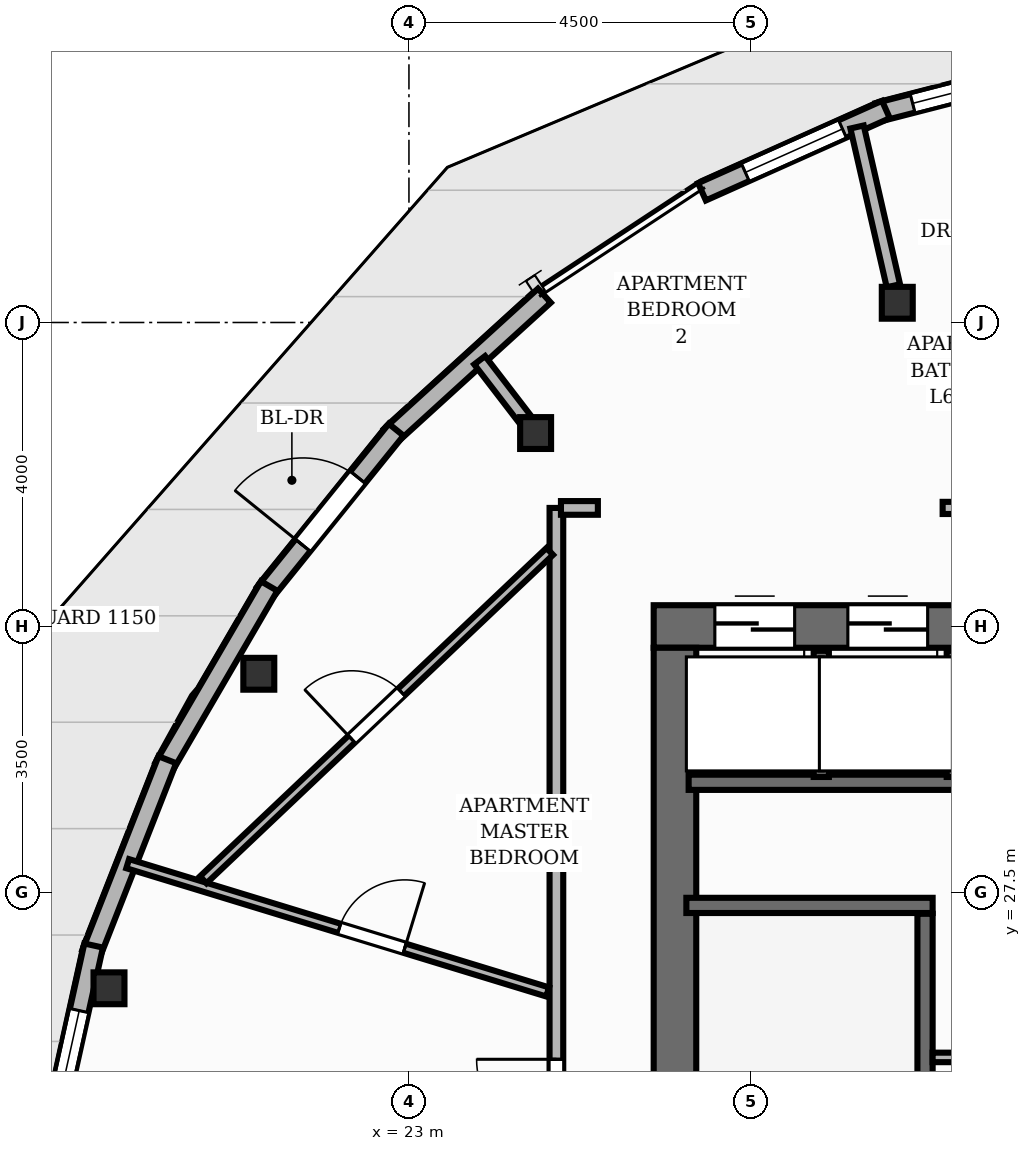
"""IFC4 building model, lengths in metres.
Left out: names, types, materials, properties, quantities, classifications, styles, units other than length and angle.
Written with IfcOpenShell. Run it as: python <this file> out.ifc"""

import sys

from ifc_helpers import new_model, si_unit, direction, frame, frame_2d, origin, origin_2d, place, context, subcontext, project, spatial, rectangle, i_section, extrude, element, fill, save


model = new_model("IFC4")
c1 = context("Model", 3, precision=1e-05, world=origin(), true_north=direction((0.0, 1.0)))
c2 = subcontext(c1, "Body", "Model", "MODEL_VIEW")
j1 = project(units=[si_unit("LENGTHUNIT", "METRE"), si_unit("PLANEANGLEUNIT", "RADIAN")], contexts=[c1])
p1 = place(None, origin())
s1 = spatial("IfcSite", under=j1, at=p1, CompositionType="ELEMENT")
p2 = place(p1, origin())
s2 = spatial("IfcBuilding", under=s1, at=p2, CompositionType="ELEMENT")
p3 = place(p2, frame((0.0, 0.0, 220.64)))
s3 = spatial("IfcBuildingStorey", under=s2, at=p3, CompositionType="ELEMENT", Elevation=220.64)
p4 = place(p3, frame((26.22, 31.0, 0.0), z_axis=(0.0, 0.0, 1.0), x_axis=(1.0, 0.0, 0.0)))
e1 = element("IfcWall", 1, at=p4, inside=s3, PredefinedType="SHEAR", context=c2, shape_type="SweptSolid", body=[
    extrude(rectangle(XDim=11.56, YDim=0.56, at=frame_2d((5.78, 0.0))), origin(), (0.0, 0.0, 1.0), 3.2),
])
p5 = place(p4, frame((8.18, 0.0, 0.0)))
e2 = element("IfcOpeningElement", 2, at=p5, cuts=e1, PredefinedType="OPENING", context=c2, shape_type="SweptSolid", body=[
    extrude(rectangle(XDim=1.1, YDim=2.15, at=frame_2d((0.55, 1.075))), frame((0.0, 0.29, 0.0), z_axis=(0.0, -1.0, 0.0), x_axis=(1.0, 0.0, 0.0)), (0.0, 0.0, 1.0), 0.58),
])
p6 = place(p4, frame((0.805, 0.0, 0.0)))
e3 = element("IfcOpeningElement", 3, at=p6, cuts=e1, PredefinedType="OPENING", context=c2, shape_type="SweptSolid", body=[
    extrude(rectangle(XDim=1.05, YDim=2.15, at=frame_2d((0.525, 1.075))), frame((0.0, 0.29, 0.0), z_axis=(0.0, -1.0, 0.0), x_axis=(1.0, 0.0, 0.0)), (0.0, 0.0, 1.0), 0.58),
])
p7 = place(p4, frame((2.555, 0.0, 0.0)))
e4 = element("IfcOpeningElement", 4, at=p7, cuts=e1, PredefinedType="OPENING", context=c2, shape_type="SweptSolid", body=[
    extrude(rectangle(XDim=1.05, YDim=2.15, at=frame_2d((0.525, 1.075))), frame((0.0, 0.29, 0.0), z_axis=(0.0, -1.0, 0.0), x_axis=(1.0, 0.0, 0.0)), (0.0, 0.0, 1.0), 0.58),
])
p8 = place(p4, frame((4.305, 0.0, 0.0)))
e5 = element("IfcOpeningElement", 5, at=p8, cuts=e1, PredefinedType="OPENING", context=c2, shape_type="SweptSolid", body=[
    extrude(rectangle(XDim=1.05, YDim=2.15, at=frame_2d((0.525, 1.075))), frame((0.0, 0.29, 0.0), z_axis=(0.0, -1.0, 0.0), x_axis=(1.0, 0.0, 0.0)), (0.0, 0.0, 1.0), 0.58),
])
p9 = place(p3, frame((26.5, 17.28, 0.0), z_axis=(0.0, 0.0, 1.0), x_axis=(0.0, 1.0, 0.0)))
e6 = element("IfcWall", 6, at=p9, inside=s3, PredefinedType="SHEAR", context=c2, shape_type="SweptSolid", body=[
    extrude(rectangle(XDim=13.44, YDim=0.56, at=frame_2d((6.72, 0.0))), origin(), (0.0, 0.0, 1.0), 3.2),
])
for number, where, z_axis, x_axis in (
    (7, (29.425, 35.26, 0.0), (0.0, 0.0, 1.0), (1.0, 0.0, 0.0)),
    (8, (24.667, 33.545, 0.0), (0.0, 0.0, 1.0), (1.0, 0.0, 0.0)),
    (9, (21.025, 30.378, 0.0), (0.0, 0.0, 1.0), (1.0, 0.0, 0.0)),
    (10, (19.054, 26.24, 0.0), (0.0, 0.0, 1.0), (1.0, 0.0, 0.0)),
):
    element("IfcColumn", number, at=place(p3, frame(where, z_axis=z_axis, x_axis=x_axis)), inside=s3, PredefinedType="COLUMN", context=c2, shape_type="SweptSolid", body=[
        extrude(i_section(OverallWidth=0.407, OverallDepth=0.419, WebThickness=0.031, FlangeThickness=0.049, at=origin_2d()), origin(), (0.0, 0.0, 1.0), 3.2),
    ])
p10 = place(p3, frame((29.171, 37.766, 0.0), z_axis=(0.0, 0.0, 1.0), x_axis=(0.968423445169, 0.249311112562, 0.0)))
e11 = element("IfcWall", 11, at=p10, inside=s3, PredefinedType="SOLIDWALL", context=c2, shape_type="SweptSolid", body=[
    extrude(rectangle(XDim=2.592, YDim=0.25, at=frame_2d((1.296, 0.0))), origin(), (0.0, 0.0, 1.0), 2.96),
])
p11 = place(p10, frame((0.471, 0.0, 0.85)))
e12 = element("IfcOpeningElement", 12, at=p11, cuts=e11, PredefinedType="OPENING", context=c2, shape_type="SweptSolid", body=[
    extrude(rectangle(XDim=1.65, YDim=1.55, at=frame_2d((0.825, 0.775))), frame((0.0, 0.135, 0.0), z_axis=(0.0, -1.0, 0.0), x_axis=(1.0, 0.0, 0.0)), (0.0, 0.0, 1.0), 0.27),
])
p12 = place(p3, frame((26.855, 36.719, 0.0), z_axis=(0.0, 0.0, 1.0), x_axis=(0.912779399898, 0.408452894617, 0.0)))
e13 = element("IfcWall", 13, at=p12, inside=s3, PredefinedType="SOLIDWALL", context=c2, shape_type="SweptSolid", body=[
    extrude(rectangle(XDim=2.651, YDim=0.25, at=frame_2d((1.325, 0.0))), origin(), (0.0, 0.0, 1.0), 2.96),
])
p13 = place(p12, frame((0.625, 0.0, 0.85)))
e14 = element("IfcOpeningElement", 14, at=p13, cuts=e13, PredefinedType="OPENING", context=c2, shape_type="SweptSolid", body=[
    extrude(rectangle(XDim=1.4, YDim=1.52, at=frame_2d((0.7, 0.76))), frame((0.0, 0.135, 0.0), z_axis=(0.0, -1.0, 0.0), x_axis=(1.0, 0.0, 0.0)), (0.0, 0.0, 1.0), 0.27),
])
p14 = place(p3, frame((22.757, 33.51, 0.0), z_axis=(0.0, 0.0, 1.0), x_axis=(0.739366950434, 0.673302690182, 0.0)))
e15 = element("IfcWall", 15, at=p14, inside=s3, PredefinedType="SOLIDWALL", context=c2, shape_type="SweptSolid", body=[
    extrude(rectangle(XDim=2.738, YDim=0.25, at=frame_2d((1.369, 0.0))), origin(), (0.0, 0.0, 1.0), 2.96),
])
p15 = place(p3, frame((21.1, 31.442, 0.0), z_axis=(0.0, 0.0, 1.0), x_axis=(0.628046541479, 0.778175778174, 0.0)))
e16 = element("IfcWall", 16, at=p15, inside=s3, PredefinedType="SOLIDWALL", context=c2, shape_type="SweptSolid", body=[
    extrude(rectangle(XDim=2.758, YDim=0.25, at=frame_2d((1.379, 0.0))), origin(), (0.0, 0.0, 1.0), 2.96),
])
p16 = place(p15, frame((0.804, 0.0, 0.0)))
e17 = element("IfcOpeningElement", 17, at=p16, cuts=e16, PredefinedType="OPENING", context=c2, shape_type="SweptSolid", body=[
    extrude(rectangle(XDim=1.15, YDim=2.2, at=frame_2d((0.575, 1.1))), frame((0.0, 0.135, 0.0), z_axis=(0.0, -1.0, 0.0), x_axis=(1.0, 0.0, 0.0)), (0.0, 0.0, 1.0), 0.27),
])
p17 = place(p3, frame((19.773, 29.149, 0.0), z_axis=(0.0, 0.0, 1.0), x_axis=(0.503177339128, 0.864183178144, 0.0)))
e18 = element("IfcWall", 18, at=p17, inside=s3, PredefinedType="SOLIDWALL", context=c2, shape_type="SweptSolid", body=[
    extrude(rectangle(XDim=2.758, YDim=0.25, at=frame_2d((1.379, 0.0))), origin(), (0.0, 0.0, 1.0), 2.96),
])
p18 = place(p3, frame((18.82, 26.698, 0.0), z_axis=(0.0, 0.0, 1.0), x_axis=(0.365588934877, 0.930776412838, 0.0)))
e19 = element("IfcWall", 19, at=p18, inside=s3, PredefinedType="SOLIDWALL", context=c2, shape_type="SweptSolid", body=[
    extrude(rectangle(XDim=2.739, YDim=0.25, at=frame_2d((1.369, 0.0))), origin(), (0.0, 0.0, 1.0), 2.577),
])
p19 = place(p3, frame((18.267, 24.164, 0.0), z_axis=(0.0, 0.0, 1.0), x_axis=(0.21633718885, 0.976318708579, 0.0)))
e20 = element("IfcWall", 20, at=p19, inside=s3, PredefinedType="SOLIDWALL", context=c2, shape_type="SweptSolid", body=[
    extrude(rectangle(XDim=2.702, YDim=0.25, at=frame_2d((1.351, 0.0))), origin(), (0.0, 0.0, 1.0), 2.577),
])
p20 = place(p19, frame((0.175, 0.0, 0.85)))
e21 = element("IfcOpeningElement", 21, at=p20, cuts=e20, PredefinedType="OPENING", context=c2, shape_type="SweptSolid", body=[
    extrude(rectangle(XDim=1.65, YDim=1.55, at=frame_2d((0.825, 0.775))), frame((0.0, 0.135, 0.0), z_axis=(0.0, -1.0, 0.0), x_axis=(1.0, 0.0, 0.0)), (0.0, 0.0, 1.0), 0.27),
])
p21 = place(p3, frame((29.79, 20.78, 0.0), z_axis=(0.0, 0.0, 1.0), x_axis=(0.0, 1.0, 0.0)))
e22 = element("IfcWall", 22, at=p21, inside=s3, PredefinedType="SHEAR", context=c2, shape_type="SweptSolid", body=[
    extrude(rectangle(XDim=6.44, YDim=0.2, at=frame_2d((3.22, 0.0))), origin(), (0.0, 0.0, 1.0), 3.2),
])
p22 = place(p3, frame((26.65, 27.33, 0.0), z_axis=(0.0, 0.0, 1.0), x_axis=(1.0, 0.0, 0.0)))
e23 = element("IfcWall", 23, at=p22, inside=s3, PredefinedType="SHEAR", context=c2, shape_type="SweptSolid", body=[
    extrude(rectangle(XDim=3.24, YDim=0.2, at=frame_2d((1.62, 0.0))), origin(), (0.0, 0.0, 1.0), 3.2),
])
p23 = place(p3, frame((26.68, 28.95, 0.0), z_axis=(0.0, 0.0, 1.0), x_axis=(1.0, 0.0, 0.0)))
e24 = element("IfcWall", 24, at=p23, inside=s3, PredefinedType="SHEAR", context=c2, shape_type="SweptSolid", body=[
    extrude(rectangle(XDim=5.24, YDim=0.2, at=frame_2d((2.62, 0.0))), origin(), (0.0, 0.0, 1.0), 3.2),
])
for number, where, z_axis, x_axis in (
    (25, (28.425, 29.02, 0.0), (0.0, 0.0, 1.0), (0.0, 1.0, 0.0)),
    (26, (30.175, 29.02, 0.0), (0.0, 0.0, 1.0), (0.0, 1.0, 0.0)),
):
    element("IfcWall", number, at=place(p3, frame(where, z_axis=z_axis, x_axis=x_axis)), inside=s3, PredefinedType="SHEAR", context=c2, shape_type="SweptSolid", body=[
        extrude(rectangle(XDim=1.66, YDim=0.2, at=frame_2d((0.83, 0.0))), origin(), (0.0, 0.0, 1.0), 3.2),
    ])
p24 = place(p3, frame((29.89, 25.33, 0.0), z_axis=(0.0, 0.0, 1.0), x_axis=(1.0, 0.0, 0.0)))
e27 = element("IfcWall", 27, at=p24, inside=s3, PredefinedType="PARTITIONING", context=c2, shape_type="SweptSolid", body=[
    extrude(rectangle(XDim=1.94, YDim=0.125, at=frame_2d((0.97, 0.0))), origin(), (0.0, 0.0, 1.0), 2.955),
])
p25 = place(p3, frame((29.374, 35.483, 0.0), z_axis=(0.0, 0.0, 1.0), x_axis=(-0.222945438732, 0.974830924493, 0.0)))
e28 = element("IfcWall", 28, at=p25, inside=s3, PredefinedType="PARTITIONING", context=c2, shape_type="SweptSolid", body=[
    extrude(rectangle(XDim=2.143, YDim=0.18, at=frame_2d((1.072, 0.0))), origin(), (0.0, 0.0, 1.0), 2.404),
])
p26 = place(p3, frame((24.527, 33.727, 0.0), z_axis=(0.0, 0.0, 1.0), x_axis=(-0.60918017505, 0.793031849503, 0.0)))
e29 = element("IfcWall", 29, at=p26, inside=s3, PredefinedType="PARTITIONING", context=c2, shape_type="SweptSolid", body=[
    extrude(rectangle(XDim=0.979, YDim=0.18, at=frame_2d((0.489, 0.0))), origin(), (0.0, 0.0, 1.0), 2.404),
])
p27 = place(p3, frame((30.022, 32.56, 0.0), z_axis=(0.0, 0.0, 1.0), x_axis=(1.0, 0.0, 0.0)))
e30 = element("IfcWall", 30, at=p27, inside=s3, PredefinedType="PLUMBINGWALL", context=c2, shape_type="SweptSolid", body=[
    extrude(rectangle(XDim=0.778, YDim=0.16, at=frame_2d((0.389, 0.0))), origin(), (0.0, 0.0, 1.0), 2.955),
])
p28 = place(p3, frame((24.94, 23.384, 0.0), z_axis=(0.0, 0.0, 1.0), x_axis=(0.0, 1.0, 0.0)))
e31 = element("IfcWall", 31, at=p28, inside=s3, PredefinedType="PARTITIONING", context=c2, shape_type="SweptSolid", body=[
    extrude(rectangle(XDim=9.177, YDim=0.18, at=frame_2d((4.588, 0.0))), origin(), (0.0, 0.0, 1.0), 2.955),
])
p29 = place(p28, frame((0.872, 0.0, 0.0)))
e32 = element("IfcOpeningElement", 32, at=p29, cuts=e31, PredefinedType="OPENING", context=c2, shape_type="SweptSolid", body=[
    extrude(rectangle(XDim=1.05, YDim=2.15, at=frame_2d((0.525, 1.075))), frame((0.0, 0.1, 0.0), z_axis=(0.0, -1.0, 0.0), x_axis=(1.0, 0.0, 0.0)), (0.0, 0.0, 1.0), 0.2),
])
p30 = place(p3, frame((25.0, 32.56, 0.0), z_axis=(0.0, 0.0, 1.0), x_axis=(1.0, 0.0, 0.0)))
e33 = element("IfcWall", 33, at=p30, inside=s3, PredefinedType="PARTITIONING", context=c2, shape_type="SweptSolid", body=[
    extrude(rectangle(XDim=0.486, YDim=0.18, at=frame_2d((0.243, 0.0))), origin(), (0.0, 0.0, 1.0), 2.955),
])
p31 = place(p3, frame((19.3, 27.879, 0.0), z_axis=(0.0, 0.0, 1.0), x_axis=(0.956379122361, -0.29212835246, 0.0)))
e34 = element("IfcWall", 34, at=p31, inside=s3, PredefinedType="PARTITIONING", context=c2, shape_type="SweptSolid", body=[
    extrude(rectangle(XDim=5.777, YDim=0.125, at=frame_2d((2.889, 0.0))), origin(), (0.0, 0.0, 1.0), 2.692),
])
p32 = place(p31, frame((2.91, 0.0, 0.0)))
e35 = element("IfcOpeningElement", 35, at=p32, cuts=e34, PredefinedType="OPENING", context=c2, shape_type="SweptSolid", body=[
    extrude(rectangle(XDim=0.9, YDim=2.1, at=frame_2d((0.45, 1.05))), frame((0.0, 0.073, 0.0), z_axis=(0.0, -1.0, 0.0), x_axis=(1.0, 0.0, 0.0)), (0.0, 0.0, 1.0), 0.145),
])
p33 = place(p3, frame((20.293, 27.667, 0.0), z_axis=(0.0, 0.0, 1.0), x_axis=(0.725799476315, 0.687906330965, 0.0)))
e36 = element("IfcWall", 36, at=p33, inside=s3, PredefinedType="PARTITIONING", context=c2, shape_type="SweptSolid", body=[
    extrude(rectangle(XDim=6.282, YDim=0.125, at=frame_2d((3.141, 0.0))), origin(), (0.0, 0.0, 1.0), 2.955),
])
p34 = place(p33, frame((2.691, 0.0, 0.0)))
e37 = element("IfcOpeningElement", 37, at=p34, cuts=e36, PredefinedType="OPENING", context=c2, shape_type="SweptSolid", body=[
    extrude(rectangle(XDim=0.9, YDim=2.1, at=frame_2d((0.45, 1.05))), frame((0.0, 0.073, 0.0), z_axis=(0.0, -1.0, 0.0), x_axis=(1.0, 0.0, 0.0)), (0.0, 0.0, 1.0), 0.145),
])
p35 = place(p16, origin())
e38 = element("IfcDoor", 38, at=p35, inside=s3, OperationType="SINGLE_SWING_LEFT", PredefinedType="DOOR", context=c2, shape_type="SweptSolid", body=[
    extrude(rectangle(XDim=1.15, YDim=2.2, at=frame_2d((0.575, 1.1))), frame((0.0, 0.025, 0.0), z_axis=(0.0, -1.0, 0.0), x_axis=(1.0, 0.0, 0.0)), (0.0, 0.0, 1.0), 0.05),
])
fill(e17, e38)
p36 = place(p11, origin())
e39 = element("IfcWindow", 39, at=p36, inside=s3, PartitioningType="SINGLE_PANEL", PredefinedType="WINDOW", context=c2, shape_type="SweptSolid", body=[
    extrude(rectangle(XDim=1.65, YDim=1.55, at=frame_2d((0.825, 0.775))), frame((0.0, 0.03, 0.0), z_axis=(0.0, -1.0, 0.0), x_axis=(1.0, 0.0, 0.0)), (0.0, 0.0, 1.0), 0.06),
])
fill(e12, e39)
p37 = place(p13, origin())
e40 = element("IfcWindow", 40, at=p37, inside=s3, PartitioningType="SINGLE_PANEL", PredefinedType="WINDOW", context=c2, shape_type="SweptSolid", body=[
    extrude(rectangle(XDim=1.4, YDim=1.52, at=frame_2d((0.7, 0.76))), frame((0.0, 0.03, 0.0), z_axis=(0.0, -1.0, 0.0), x_axis=(1.0, 0.0, 0.0)), (0.0, 0.0, 1.0), 0.06),
])
fill(e14, e40)
p38 = place(p20, origin())
e41 = element("IfcWindow", 41, at=p38, inside=s3, PartitioningType="SINGLE_PANEL", PredefinedType="WINDOW", context=c2, shape_type="SweptSolid", body=[
    extrude(rectangle(XDim=1.65, YDim=1.55, at=frame_2d((0.825, 0.775))), frame((0.0, 0.03, 0.0), z_axis=(0.0, -1.0, 0.0), x_axis=(1.0, 0.0, 0.0)), (0.0, 0.0, 1.0), 0.06),
])
fill(e21, e41)
p39 = place(p6, origin())
e42 = element("IfcDoor", 42, at=p39, inside=s3, OperationType="DOUBLE_DOOR_SLIDING", PredefinedType="DOOR", context=c2, shape_type="SweptSolid", body=[
    extrude(rectangle(XDim=1.05, YDim=2.15, at=frame_2d((0.525, 1.075))), frame((0.0, 0.025, 0.0), z_axis=(0.0, -1.0, 0.0), x_axis=(1.0, 0.0, 0.0)), (0.0, 0.0, 1.0), 0.05),
])
fill(e3, e42)
p40 = place(p7, origin())
e43 = element("IfcDoor", 43, at=p40, inside=s3, OperationType="DOUBLE_DOOR_SLIDING", PredefinedType="DOOR", context=c2, shape_type="SweptSolid", body=[
    extrude(rectangle(XDim=1.05, YDim=2.15, at=frame_2d((0.525, 1.075))), frame((0.0, 0.025, 0.0), z_axis=(0.0, -1.0, 0.0), x_axis=(1.0, 0.0, 0.0)), (0.0, 0.0, 1.0), 0.05),
])
fill(e4, e43)
p41 = place(p29, origin())
e44 = element("IfcDoor", 44, at=p41, inside=s3, OperationType="SINGLE_SWING_RIGHT", PredefinedType="DOOR", context=c2, shape_type="SweptSolid", body=[
    extrude(rectangle(XDim=1.05, YDim=2.15, at=frame_2d((0.525, 1.075))), frame((0.0, 0.025, 0.0), z_axis=(0.0, -1.0, 0.0), x_axis=(1.0, 0.0, 0.0)), (0.0, 0.0, 1.0), 0.05),
])
fill(e32, e44)
p42 = place(p32, origin())
e45 = element("IfcDoor", 45, at=p42, inside=s3, OperationType="SINGLE_SWING_RIGHT", PredefinedType="DOOR", context=c2, shape_type="SweptSolid", body=[
    extrude(rectangle(XDim=0.9, YDim=2.1, at=frame_2d((0.45, 1.05))), frame((0.0, 0.025, 0.0), z_axis=(0.0, -1.0, 0.0), x_axis=(1.0, 0.0, 0.0)), (0.0, 0.0, 1.0), 0.05),
])
fill(e35, e45)
p43 = place(p34, origin())
e46 = element("IfcDoor", 46, at=p43, inside=s3, OperationType="SINGLE_SWING_LEFT", PredefinedType="DOOR", context=c2, shape_type="SweptSolid", body=[
    extrude(rectangle(XDim=0.9, YDim=2.1, at=frame_2d((0.45, 1.05))), frame((0.0, 0.025, 0.0), z_axis=(0.0, -1.0, 0.0), x_axis=(1.0, 0.0, 0.0)), (0.0, 0.0, 1.0), 0.05),
])
fill(e37, e46)
save(model, sys.argv[1])
